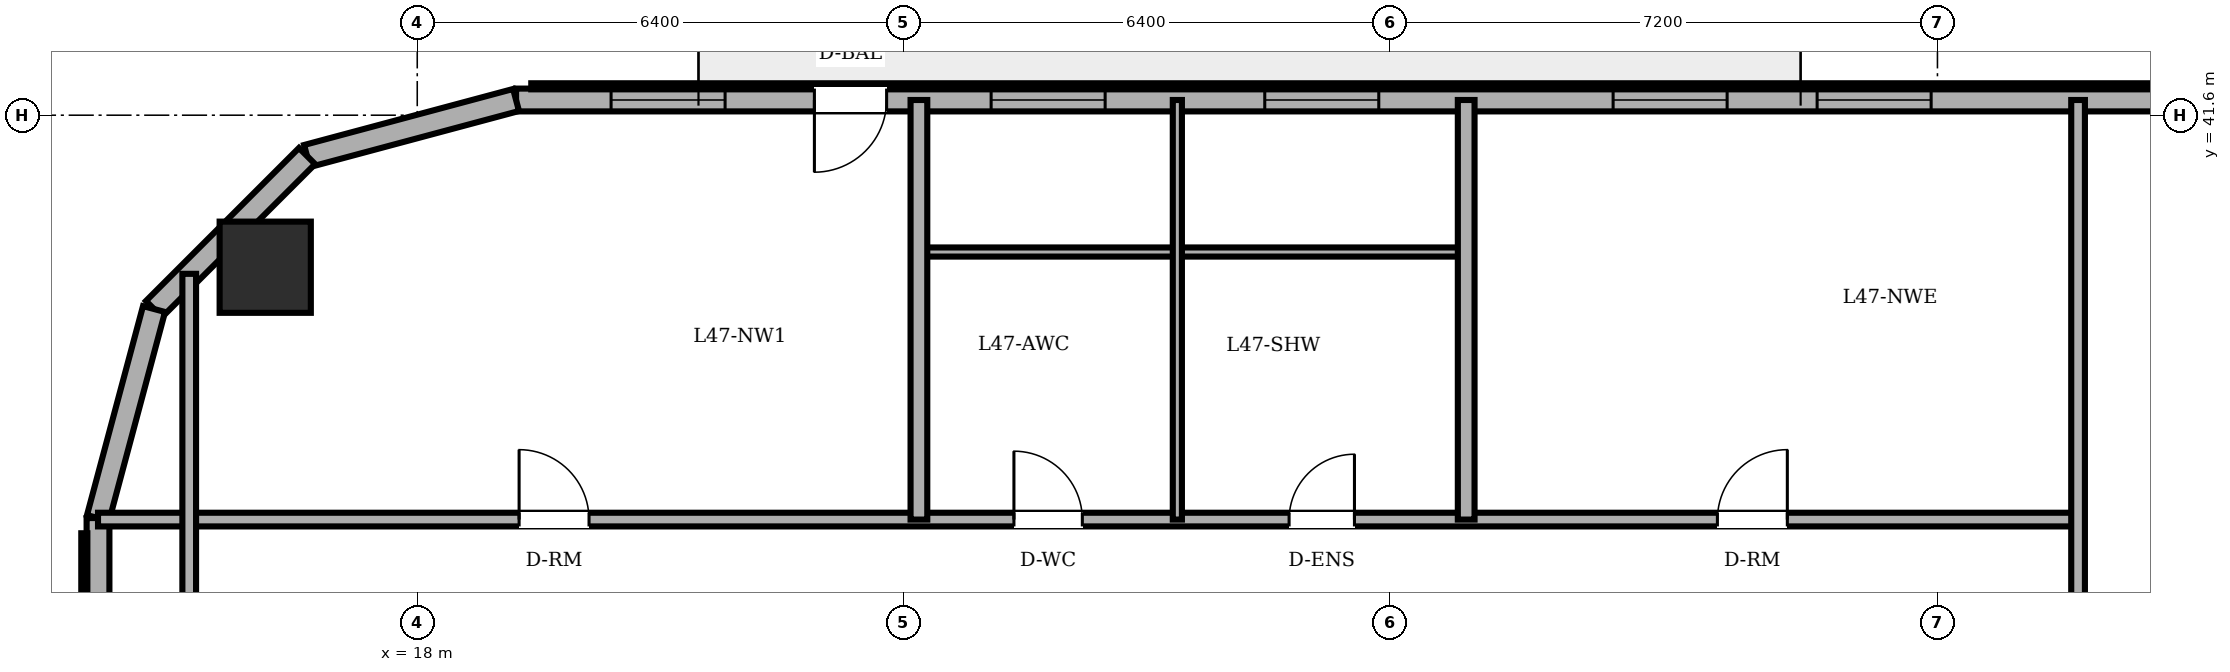
"""IFC4 building model, lengths in metres.
Left out: names, types, materials, properties, quantities, classifications, styles, units other than length and angle.
Written with IfcOpenShell. Run it as: python <this file> out.ifc"""

import sys

from ifc_helpers import new_model, si_unit, direction, frame, frame_2d, origin, origin_2d, place, context, subcontext, project, spatial, rectangle, circle, extrude, element, fill, save


model = new_model("IFC4")
c1 = context("Model", 3, precision=1e-05, world=origin(), true_north=direction((0.0, 1.0)))
c2 = subcontext(c1, "Body", "Model", "MODEL_VIEW")
j1 = project(units=[si_unit("LENGTHUNIT", "METRE"), si_unit("PLANEANGLEUNIT", "RADIAN")], contexts=[c1])
p1 = place(None, origin())
s1 = spatial("IfcSite", under=j1, at=p1, CompositionType="ELEMENT")
p2 = place(p1, origin())
s2 = spatial("IfcBuilding", under=s1, at=p2, CompositionType="ELEMENT")
p3 = place(p2, frame((0.0, 0.0, 179.8)))
s3 = spatial("IfcBuildingStorey", under=s2, at=p3, CompositionType="ELEMENT", Elevation=179.8)
p4 = place(p3, frame((16.0, 39.6, 0.0), z_axis=(0.0, 0.0, 1.0), x_axis=(1.0, 0.0, 0.0)))
e1 = element("IfcColumn", 1, at=p4, inside=s3, PredefinedType="COLUMN", context=c2, shape_type="SweptSolid", body=[
    extrude(circle(Radius=0.6, at=origin_2d()), origin(), (0.0, 0.0, 1.0), 3.6),
])
p5 = place(p3, frame((49.582, 41.8, 0.0), z_axis=(0.0, 0.0, 1.0), x_axis=(-1.0, 0.0, 0.0)))
e2 = element("IfcWall", 2, at=p5, inside=s3, PredefinedType="SOLIDWALL", context=c2, shape_type="SweptSolid", body=[
    extrude(rectangle(XDim=30.282, YDim=0.3, at=frame_2d((15.141, 0.0))), origin(), (0.0, 0.0, 1.0), 3.4),
])
p6 = place(p5, frame((25.407, 0.0, 0.0)))
e3 = element("IfcOpeningElement", 3, at=p6, cuts=e2, PredefinedType="OPENING", context=c2, shape_type="SweptSolid", body=[
    extrude(rectangle(XDim=0.95, YDim=2.2, at=frame_2d((0.475, 1.1))), frame((0.0, 0.16, 0.0), z_axis=(0.0, -1.0, 0.0), x_axis=(1.0, 0.0, 0.0)), (0.0, 0.0, 1.0), 0.32),
])
p7 = place(p5, frame((1.527, 0.0, 0.85)))
e4 = element("IfcOpeningElement", 4, at=p7, cuts=e2, PredefinedType="OPENING", context=c2, shape_type="SweptSolid", body=[
    extrude(rectangle(XDim=1.5, YDim=1.55, at=frame_2d((0.75, 0.775))), frame((0.0, 0.16, 0.0), z_axis=(0.0, -1.0, 0.0), x_axis=(1.0, 0.0, 0.0)), (0.0, 0.0, 1.0), 0.32),
])
p8 = place(p5, frame((3.455, 0.0, 0.85)))
e5 = element("IfcOpeningElement", 5, at=p8, cuts=e2, PredefinedType="OPENING", context=c2, shape_type="SweptSolid", body=[
    extrude(rectangle(XDim=1.5, YDim=1.55, at=frame_2d((0.75, 0.775))), frame((0.0, 0.16, 0.0), z_axis=(0.0, -1.0, 0.0), x_axis=(1.0, 0.0, 0.0)), (0.0, 0.0, 1.0), 0.32),
])
p9 = place(p5, frame((7.182, 0.0, 0.85)))
e6 = element("IfcOpeningElement", 6, at=p9, cuts=e2, PredefinedType="OPENING", context=c2, shape_type="SweptSolid", body=[
    extrude(rectangle(XDim=1.5, YDim=1.55, at=frame_2d((0.75, 0.775))), frame((0.0, 0.16, 0.0), z_axis=(0.0, -1.0, 0.0), x_axis=(1.0, 0.0, 0.0)), (0.0, 0.0, 1.0), 0.32),
])
p10 = place(p5, frame((11.665, 0.0, 0.85)))
e7 = element("IfcOpeningElement", 7, at=p10, cuts=e2, PredefinedType="OPENING", context=c2, shape_type="SweptSolid", body=[
    extrude(rectangle(XDim=1.5, YDim=1.55, at=frame_2d((0.75, 0.775))), frame((0.0, 0.16, 0.0), z_axis=(0.0, -1.0, 0.0), x_axis=(1.0, 0.0, 0.0)), (0.0, 0.0, 1.0), 0.32),
])
p11 = place(p5, frame((14.349, 0.0, 0.85)))
e8 = element("IfcOpeningElement", 8, at=p11, cuts=e2, PredefinedType="OPENING", context=c2, shape_type="SweptSolid", body=[
    extrude(rectangle(XDim=1.5, YDim=1.55, at=frame_2d((0.75, 0.775))), frame((0.0, 0.16, 0.0), z_axis=(0.0, -1.0, 0.0), x_axis=(1.0, 0.0, 0.0)), (0.0, 0.0, 1.0), 0.32),
])
p12 = place(p5, frame((18.932, 0.0, 0.85)))
e9 = element("IfcOpeningElement", 9, at=p12, cuts=e2, PredefinedType="OPENING", context=c2, shape_type="SweptSolid", body=[
    extrude(rectangle(XDim=1.5, YDim=1.55, at=frame_2d((0.75, 0.775))), frame((0.0, 0.16, 0.0), z_axis=(0.0, -1.0, 0.0), x_axis=(1.0, 0.0, 0.0)), (0.0, 0.0, 1.0), 0.32),
])
p13 = place(p5, frame((22.532, 0.0, 0.85)))
e10 = element("IfcOpeningElement", 10, at=p13, cuts=e2, PredefinedType="OPENING", context=c2, shape_type="SweptSolid", body=[
    extrude(rectangle(XDim=1.5, YDim=1.55, at=frame_2d((0.75, 0.775))), frame((0.0, 0.16, 0.0), z_axis=(0.0, -1.0, 0.0), x_axis=(1.0, 0.0, 0.0)), (0.0, 0.0, 1.0), 0.32),
])
p14 = place(p5, frame((27.532, 0.0, 0.85)))
e11 = element("IfcOpeningElement", 11, at=p14, cuts=e2, PredefinedType="OPENING", context=c2, shape_type="SweptSolid", body=[
    extrude(rectangle(XDim=1.5, YDim=1.55, at=frame_2d((0.75, 0.775))), frame((0.0, 0.16, 0.0), z_axis=(0.0, -1.0, 0.0), x_axis=(1.0, 0.0, 0.0)), (0.0, 0.0, 1.0), 0.32),
])
p15 = place(p3, frame((19.3, 41.8, 0.0), z_axis=(0.0, 0.0, 1.0), x_axis=(-0.965908238586, -0.258884674387, 0.0)))
e12 = element("IfcWall", 12, at=p15, inside=s3, PredefinedType="SOLIDWALL", context=c2, shape_type="SweptSolid", body=[
    extrude(rectangle(XDim=2.847, YDim=0.3, at=frame_2d((1.424, 0.0))), origin(), (0.0, 0.0, 1.0), 3.4),
])
p16 = place(p3, frame((16.55, 41.063, 0.0), z_axis=(0.0, 0.0, 1.0), x_axis=(-0.707106781187, -0.707106781187, 0.0)))
e13 = element("IfcWall", 13, at=p16, inside=s3, PredefinedType="SOLIDWALL", context=c2, shape_type="SweptSolid", body=[
    extrude(rectangle(XDim=2.847, YDim=0.3, at=frame_2d((1.423, 0.0))), origin(), (0.0, 0.0, 1.0), 3.4),
])
p17 = place(p3, frame((14.537, 39.05, 0.0), z_axis=(0.0, 0.0, 1.0), x_axis=(-0.258884674387, -0.965908238586, 0.0)))
e14 = element("IfcWall", 14, at=p17, inside=s3, PredefinedType="SOLIDWALL", context=c2, shape_type="SweptSolid", body=[
    extrude(rectangle(XDim=2.847, YDim=0.3, at=frame_2d((1.424, 0.0))), origin(), (0.0, 0.0, 1.0), 3.4),
])
p18 = place(p3, frame((13.8, 36.3, 0.0), z_axis=(0.0, 0.0, 1.0), x_axis=(0.0, -1.0, 0.0)))
e15 = element("IfcWall", 15, at=p18, inside=s3, PredefinedType="SOLIDWALL", context=c2, shape_type="SweptSolid", body=[
    extrude(rectangle(XDim=24.6, YDim=0.3, at=frame_2d((12.3, 0.0))), origin(), (0.0, 0.0, 1.0), 3.4),
])
p19 = place(p18, frame((5.003, 0.0, 0.85)))
e16 = element("IfcOpeningElement", 16, at=p19, cuts=e15, PredefinedType="OPENING", context=c2, shape_type="SweptSolid", body=[
    extrude(rectangle(XDim=1.5, YDim=1.55, at=frame_2d((0.75, 0.775))), frame((0.0, 0.16, 0.0), z_axis=(0.0, -1.0, 0.0), x_axis=(1.0, 0.0, 0.0)), (0.0, 0.0, 1.0), 0.32),
])
p20 = place(p18, frame((8.277, 0.0, 0.85)))
e17 = element("IfcOpeningElement", 17, at=p20, cuts=e15, PredefinedType="OPENING", context=c2, shape_type="SweptSolid", body=[
    extrude(rectangle(XDim=1.5, YDim=1.55, at=frame_2d((0.75, 0.775))), frame((0.0, 0.16, 0.0), z_axis=(0.0, -1.0, 0.0), x_axis=(1.0, 0.0, 0.0)), (0.0, 0.0, 1.0), 0.32),
])
p21 = place(p18, frame((14.823, 0.0, 0.85)))
e18 = element("IfcOpeningElement", 18, at=p21, cuts=e15, PredefinedType="OPENING", context=c2, shape_type="SweptSolid", body=[
    extrude(rectangle(XDim=1.5, YDim=1.55, at=frame_2d((0.75, 0.775))), frame((0.0, 0.16, 0.0), z_axis=(0.0, -1.0, 0.0), x_axis=(1.0, 0.0, 0.0)), (0.0, 0.0, 1.0), 0.32),
])
p22 = place(p18, frame((18.097, 0.0, 0.85)))
e19 = element("IfcOpeningElement", 19, at=p22, cuts=e15, PredefinedType="OPENING", context=c2, shape_type="SweptSolid", body=[
    extrude(rectangle(XDim=1.5, YDim=1.55, at=frame_2d((0.75, 0.775))), frame((0.0, 0.16, 0.0), z_axis=(0.0, -1.0, 0.0), x_axis=(1.0, 0.0, 0.0)), (0.0, 0.0, 1.0), 0.32),
])
p23 = place(p3, frame((13.8, 36.28, 0.0), z_axis=(0.0, 0.0, 1.0), x_axis=(1.0, 0.0, 0.0)))
e20 = element("IfcWall", 20, at=p23, inside=s3, PredefinedType="PARTITIONING", context=c2, shape_type="SweptSolid", body=[
    extrude(rectangle(XDim=26.05, YDim=0.18, at=frame_2d((13.025, 0.0))), origin(), (0.0, 0.0, 1.0), 3.4),
])
p24 = place(p23, frame((12.05, 0.0, 0.0)))
e21 = element("IfcOpeningElement", 21, at=p24, cuts=e20, PredefinedType="OPENING", context=c2, shape_type="SweptSolid", body=[
    extrude(rectangle(XDim=0.9, YDim=2.1, at=frame_2d((0.45, 1.05))), frame((0.0, 0.1, 0.0), z_axis=(0.0, -1.0, 0.0), x_axis=(1.0, 0.0, 0.0)), (0.0, 0.0, 1.0), 0.2),
])
p25 = place(p23, frame((15.67, 0.0, 0.0)))
e22 = element("IfcOpeningElement", 22, at=p25, cuts=e20, PredefinedType="OPENING", context=c2, shape_type="SweptSolid", body=[
    extrude(rectangle(XDim=0.86, YDim=2.1, at=frame_2d((0.43, 1.05))), frame((0.0, 0.1, 0.0), z_axis=(0.0, -1.0, 0.0), x_axis=(1.0, 0.0, 0.0)), (0.0, 0.0, 1.0), 0.2),
])
p26 = place(p23, frame((5.54, 0.0, 0.0)))
e23 = element("IfcOpeningElement", 23, at=p26, cuts=e20, PredefinedType="OPENING", context=c2, shape_type="SweptSolid", body=[
    extrude(rectangle(XDim=0.92, YDim=2.1, at=frame_2d((0.46, 1.05))), frame((0.0, 0.1, 0.0), z_axis=(0.0, -1.0, 0.0), x_axis=(1.0, 0.0, 0.0)), (0.0, 0.0, 1.0), 0.2),
])
p27 = place(p23, frame((21.305, 0.0, 0.0)))
e24 = element("IfcOpeningElement", 24, at=p27, cuts=e20, PredefinedType="OPENING", context=c2, shape_type="SweptSolid", body=[
    extrude(rectangle(XDim=0.92, YDim=2.1, at=frame_2d((0.46, 1.05))), frame((0.0, 0.1, 0.0), z_axis=(0.0, -1.0, 0.0), x_axis=(1.0, 0.0, 0.0)), (0.0, 0.0, 1.0), 0.2),
])
p28 = place(p3, frame((24.6, 39.8, 0.0), z_axis=(0.0, 0.0, 1.0), x_axis=(1.0, 0.0, 0.0)))
e25 = element("IfcWall", 25, at=p28, inside=s3, PredefinedType="PARTITIONING", context=c2, shape_type="SweptSolid", body=[
    extrude(rectangle(XDim=7.2, YDim=0.12, at=frame_2d((3.6, 0.0))), origin(), (0.0, 0.0, 1.0), 2.882),
])
p29 = place(p3, frame((15.0, 33.82, 0.0), z_axis=(0.0, 0.0, 1.0), x_axis=(0.0, 1.0, 0.0)))
e26 = element("IfcWall", 26, at=p29, inside=s3, PredefinedType="PARTITIONING", context=c2, shape_type="SweptSolid", body=[
    extrude(rectangle(XDim=5.693, YDim=0.18, at=frame_2d((2.846, 0.0))), origin(), (0.0, 0.0, 1.0), 3.4),
])
p30 = place(p3, frame((24.6, 36.28, 0.0), z_axis=(0.0, 0.0, 1.0), x_axis=(0.0, 1.0, 0.0)))
e27 = element("IfcWall", 27, at=p30, inside=s3, PredefinedType="PARTITIONING", context=c2, shape_type="SweptSolid", body=[
    extrude(rectangle(XDim=5.52, YDim=0.22, at=frame_2d((2.76, 0.0))), origin(), (0.0, 0.0, 1.0), 3.4),
])
p31 = place(p3, frame((28.0, 36.28, 0.0), z_axis=(0.0, 0.0, 1.0), x_axis=(0.0, 1.0, 0.0)))
e28 = element("IfcWall", 28, at=p31, inside=s3, PredefinedType="PARTITIONING", context=c2, shape_type="SweptSolid", body=[
    extrude(rectangle(XDim=5.52, YDim=0.12, at=frame_2d((2.76, 0.0))), origin(), (0.0, 0.0, 1.0), 3.4),
])
p32 = place(p3, frame((31.8, 36.28, 0.0), z_axis=(0.0, 0.0, 1.0), x_axis=(0.0, 1.0, 0.0)))
e29 = element("IfcWall", 29, at=p32, inside=s3, PredefinedType="PARTITIONING", context=c2, shape_type="SweptSolid", body=[
    extrude(rectangle(XDim=5.52, YDim=0.22, at=frame_2d((2.76, 0.0))), origin(), (0.0, 0.0, 1.0), 3.4),
])
p33 = place(p3, frame((39.85, 25.18, 0.0), z_axis=(0.0, 0.0, 1.0), x_axis=(0.0, 1.0, 0.0)))
e30 = element("IfcWall", 30, at=p33, inside=s3, PredefinedType="PARTITIONING", context=c2, shape_type="SweptSolid", body=[
    extrude(rectangle(XDim=16.62, YDim=0.18, at=frame_2d((8.31, 0.0))), origin(), (0.0, 0.0, 1.0), 3.4),
])
p34 = place(p33, frame((5.35, 0.0, 0.0)))
e31 = element("IfcOpeningElement", 31, at=p34, cuts=e30, PredefinedType="OPENING", context=c2, shape_type="SweptSolid", body=[
    extrude(rectangle(XDim=0.92, YDim=2.1, at=frame_2d((0.46, 1.05))), frame((0.0, 0.1, 0.0), z_axis=(0.0, -1.0, 0.0), x_axis=(1.0, 0.0, 0.0)), (0.0, 0.0, 1.0), 0.2),
])
p35 = place(p6, origin())
e32 = element("IfcDoor", 32, at=p35, inside=s3, OperationType="SINGLE_SWING_RIGHT", PredefinedType="DOOR", context=c2, shape_type="SweptSolid", body=[
    extrude(rectangle(XDim=0.95, YDim=2.2, at=frame_2d((0.475, 1.1))), frame((0.0, 0.025, 0.0), z_axis=(0.0, -1.0, 0.0), x_axis=(1.0, 0.0, 0.0)), (0.0, 0.0, 1.0), 0.05),
])
fill(e3, e32)
p36 = place(p10, origin())
e33 = element("IfcWindow", 33, at=p36, inside=s3, PartitioningType="DOUBLE_PANEL_VERTICAL", PredefinedType="WINDOW", context=c2, shape_type="SweptSolid", body=[
    extrude(rectangle(XDim=1.5, YDim=1.55, at=frame_2d((0.75, 0.775))), frame((0.0, 0.03, 0.0), z_axis=(0.0, -1.0, 0.0), x_axis=(1.0, 0.0, 0.0)), (0.0, 0.0, 1.0), 0.06),
])
fill(e7, e33)
p37 = place(p11, origin())
e34 = element("IfcWindow", 34, at=p37, inside=s3, PartitioningType="DOUBLE_PANEL_VERTICAL", PredefinedType="WINDOW", context=c2, shape_type="SweptSolid", body=[
    extrude(rectangle(XDim=1.5, YDim=1.55, at=frame_2d((0.75, 0.775))), frame((0.0, 0.03, 0.0), z_axis=(0.0, -1.0, 0.0), x_axis=(1.0, 0.0, 0.0)), (0.0, 0.0, 1.0), 0.06),
])
fill(e8, e34)
p38 = place(p12, origin())
e35 = element("IfcWindow", 35, at=p38, inside=s3, PartitioningType="DOUBLE_PANEL_VERTICAL", PredefinedType="WINDOW", context=c2, shape_type="SweptSolid", body=[
    extrude(rectangle(XDim=1.5, YDim=1.55, at=frame_2d((0.75, 0.775))), frame((0.0, 0.03, 0.0), z_axis=(0.0, -1.0, 0.0), x_axis=(1.0, 0.0, 0.0)), (0.0, 0.0, 1.0), 0.06),
])
fill(e9, e35)
p39 = place(p13, origin())
e36 = element("IfcWindow", 36, at=p39, inside=s3, PartitioningType="DOUBLE_PANEL_VERTICAL", PredefinedType="WINDOW", context=c2, shape_type="SweptSolid", body=[
    extrude(rectangle(XDim=1.5, YDim=1.55, at=frame_2d((0.75, 0.775))), frame((0.0, 0.03, 0.0), z_axis=(0.0, -1.0, 0.0), x_axis=(1.0, 0.0, 0.0)), (0.0, 0.0, 1.0), 0.06),
])
fill(e10, e36)
p40 = place(p14, origin())
e37 = element("IfcWindow", 37, at=p40, inside=s3, PartitioningType="DOUBLE_PANEL_VERTICAL", PredefinedType="WINDOW", context=c2, shape_type="SweptSolid", body=[
    extrude(rectangle(XDim=1.5, YDim=1.55, at=frame_2d((0.75, 0.775))), frame((0.0, 0.03, 0.0), z_axis=(0.0, -1.0, 0.0), x_axis=(1.0, 0.0, 0.0)), (0.0, 0.0, 1.0), 0.06),
])
fill(e11, e37)
p41 = place(p24, origin())
e38 = element("IfcDoor", 38, at=p41, inside=s3, OperationType="SINGLE_SWING_LEFT", PredefinedType="DOOR", context=c2, shape_type="SweptSolid", body=[
    extrude(rectangle(XDim=0.9, YDim=2.1, at=frame_2d((0.45, 1.05))), frame((0.0, 0.025, 0.0), z_axis=(0.0, -1.0, 0.0), x_axis=(1.0, 0.0, 0.0)), (0.0, 0.0, 1.0), 0.05),
])
fill(e21, e38)
p42 = place(p25, origin())
e39 = element("IfcDoor", 39, at=p42, inside=s3, OperationType="SINGLE_SWING_RIGHT", PredefinedType="DOOR", context=c2, shape_type="SweptSolid", body=[
    extrude(rectangle(XDim=0.86, YDim=2.1, at=frame_2d((0.43, 1.05))), frame((0.0, 0.025, 0.0), z_axis=(0.0, -1.0, 0.0), x_axis=(1.0, 0.0, 0.0)), (0.0, 0.0, 1.0), 0.05),
])
fill(e22, e39)
p43 = place(p26, origin())
e40 = element("IfcDoor", 40, at=p43, inside=s3, OperationType="SINGLE_SWING_LEFT", PredefinedType="DOOR", context=c2, shape_type="SweptSolid", body=[
    extrude(rectangle(XDim=0.92, YDim=2.1, at=frame_2d((0.46, 1.05))), frame((0.0, 0.025, 0.0), z_axis=(0.0, -1.0, 0.0), x_axis=(1.0, 0.0, 0.0)), (0.0, 0.0, 1.0), 0.05),
])
fill(e23, e40)
p44 = place(p27, origin())
e41 = element("IfcDoor", 41, at=p44, inside=s3, OperationType="SINGLE_SWING_RIGHT", PredefinedType="DOOR", context=c2, shape_type="SweptSolid", body=[
    extrude(rectangle(XDim=0.92, YDim=2.1, at=frame_2d((0.46, 1.05))), frame((0.0, 0.025, 0.0), z_axis=(0.0, -1.0, 0.0), x_axis=(1.0, 0.0, 0.0)), (0.0, 0.0, 1.0), 0.05),
])
fill(e24, e41)
save(model, sys.argv[1])
